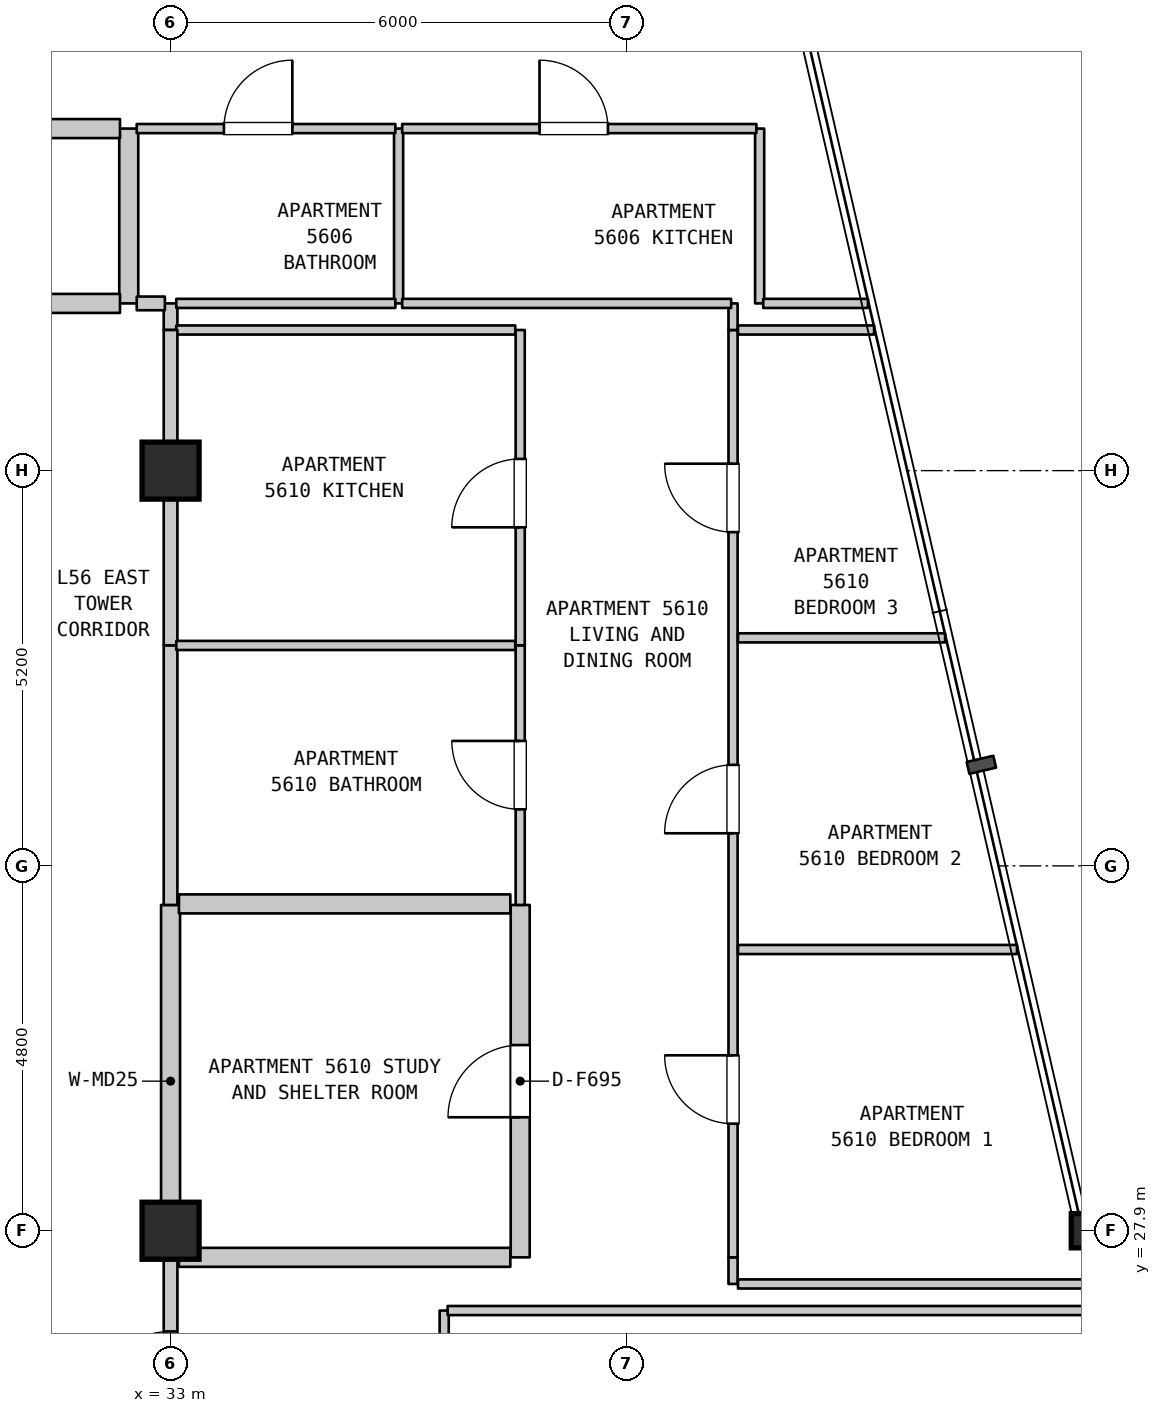
"""IFC4 building model, lengths in metres.
Left out: names, types, materials, properties, quantities, classifications, styles, units other than length and angle.
Written with IfcOpenShell. Run it as: python <this file> out.ifc"""

import sys

from ifc_helpers import new_model, si_unit, direction, frame, frame_2d, origin, origin_2d, place, context, subcontext, project, spatial, rectangle, i_section, extrude, element, fill, save


model = new_model("IFC4")
c1 = context("Model", 3, precision=1e-05, world=origin(), true_north=direction((0.0, 1.0)))
c2 = subcontext(c1, "Body", "Model", "MODEL_VIEW")
j1 = project(units=[si_unit("LENGTHUNIT", "METRE"), si_unit("PLANEANGLEUNIT", "RADIAN")], contexts=[c1])
p1 = place(None, origin())
s1 = spatial("IfcSite", under=j1, at=p1, CompositionType="ELEMENT")
p2 = place(p1, origin())
s2 = spatial("IfcBuilding", under=s1, at=p2, CompositionType="ELEMENT")
p3 = place(p2, frame((0.0, 0.0, 226.5)))
s3 = spatial("IfcBuildingStorey", under=s2, at=p3, CompositionType="ELEMENT", Elevation=226.5)
for number, where, z_axis, x_axis in (
    (1, (33.0, 27.9, 0.0), (0.0, 0.0, 1.0), (1.0, 0.0, 0.0)),
    (2, (33.0, 37.9, 0.0), (0.0, 0.0, 1.0), (1.0, 0.0, 0.0)),
):
    element("IfcColumn", number, at=place(p3, frame(where, z_axis=z_axis, x_axis=x_axis)), inside=s3, PredefinedType="COLUMN", context=c2, shape_type="SweptSolid", body=[
        extrude(rectangle(XDim=0.75, YDim=0.75, at=origin_2d()), origin(), (0.0, 0.0, 1.0), 3.7),
    ])
p4 = place(p3, frame((45.0, 27.9, 0.0), z_axis=(0.0, 0.0, 1.0), x_axis=(1.0, 0.0, 0.0)))
e3 = element("IfcColumn", 3, at=p4, inside=s3, PredefinedType="COLUMN", context=c2, shape_type="SweptSolid", body=[
    extrude(i_section(OverallWidth=0.3, OverallDepth=0.45, WebThickness=0.014, FlangeThickness=0.026, FilletRadius=0.027, at=origin_2d()), origin(), (0.0, 0.0, 1.0), 3.7),
])
p5 = place(p3, frame((32.45, 40.1, 0.0), z_axis=(0.0, 0.0, 1.0), x_axis=(0.0, 1.0, 0.0)))
e4 = element("IfcWall", 4, at=p5, inside=s3, PredefinedType="STANDARD", context=c2, shape_type="SweptSolid", body=[
    extrude(rectangle(XDim=2.3, YDim=0.25, at=frame_2d((1.15, 0.0))), origin(), (0.0, 0.0, 1.0), 3.39),
])
p6 = place(p3, frame((33.0, 24.6, 0.0), z_axis=(0.0, 0.0, 1.0), x_axis=(0.0, 1.0, 0.0)))
e5 = element("IfcWall", 5, at=p6, inside=s3, PredefinedType="STANDARD", context=c2, shape_type="SweptSolid", body=[
    extrude(rectangle(XDim=2.95, YDim=0.18, at=frame_2d((1.475, 0.0))), origin(), (0.0, 0.0, 1.0), 2.99),
])
p7 = place(p6, frame((0.975, 0.0, 0.0)))
e6 = element("IfcOpeningElement", 6, at=p7, cuts=e5, PredefinedType="OPENING", context=c2, shape_type="SweptSolid", body=[
    extrude(rectangle(XDim=1.0, YDim=2.15, at=frame_2d((0.5, 1.075))), frame((0.0, 0.1, 0.0), z_axis=(0.0, -1.0, 0.0), x_axis=(1.0, 0.0, 0.0)), (0.0, 0.0, 1.0), 0.2),
])
p8 = place(p3, frame((33.0, 27.55, 0.0), z_axis=(0.0, 0.0, 1.0), x_axis=(0.0, 1.0, 0.0)))
e7 = element("IfcWall", 7, at=p8, inside=s3, PredefinedType="STANDARD", context=c2, shape_type="SweptSolid", body=[
    extrude(rectangle(XDim=4.636, YDim=0.25, at=frame_2d((2.318, 0.0))), origin(), (0.0, 0.0, 1.0), 2.89),
])
p9 = place(p3, frame((33.0, 32.186, 0.0), z_axis=(0.0, 0.0, 1.0), x_axis=(0.0, 1.0, 0.0)))
e8 = element("IfcWall", 8, at=p9, inside=s3, PredefinedType="STANDARD", context=c2, shape_type="SweptSolid", body=[
    extrude(rectangle(XDim=3.416, YDim=0.18, at=frame_2d((1.708, 0.0))), origin(), (0.0, 0.0, 1.0), 2.89),
])
p10 = place(p3, frame((33.0, 35.602, 0.0), z_axis=(0.0, 0.0, 1.0), x_axis=(0.0, 1.0, 0.0)))
e9 = element("IfcWall", 9, at=p10, inside=s3, PredefinedType="STANDARD", context=c2, shape_type="SweptSolid", body=[
    extrude(rectangle(XDim=2.298, YDim=0.18, at=frame_2d((1.149, 0.0))), origin(), (0.0, 0.0, 1.0), 2.89),
])
p11 = place(p3, frame((33.0, 39.75, 0.0), z_axis=(0.0, 0.0, 1.0), x_axis=(0.0, 1.0, 0.0)))
e10 = element("IfcWall", 10, at=p11, inside=s3, PredefinedType="STANDARD", context=c2, shape_type="SweptSolid", body=[
    extrude(rectangle(XDim=0.35, YDim=0.18, at=frame_2d((0.175, 0.0))), origin(), (0.0, 0.0, 1.0), 3.39),
])
p12 = place(p3, frame((36.0, 40.1, 0.0), z_axis=(0.0, 0.0, 1.0), x_axis=(0.0, 1.0, 0.0)))
e11 = element("IfcWall", 11, at=p12, inside=s3, PredefinedType="PARTITIONING", context=c2, shape_type="SweptSolid", body=[
    extrude(rectangle(XDim=2.3, YDim=0.12, at=frame_2d((1.15, 0.0))), origin(), (0.0, 0.0, 1.0), 3.39),
])
p13 = place(p3, frame((36.6, 24.6, 0.0), z_axis=(0.0, 0.0, 1.0), x_axis=(0.0, 1.0, 0.0)))
e12 = element("IfcWall", 12, at=p13, inside=s3, PredefinedType="PARTITIONING", context=c2, shape_type="SweptSolid", body=[
    extrude(rectangle(XDim=2.25, YDim=0.12, at=frame_2d((1.125, 0.0))), origin(), (0.0, 0.0, 1.0), 3.39),
])
p14 = place(p13, frame((0.598, 0.0, 0.0)))
e13 = element("IfcOpeningElement", 13, at=p14, cuts=e12, PredefinedType="OPENING", context=c2, shape_type="SweptSolid", body=[
    extrude(rectangle(XDim=0.9, YDim=2.15, at=frame_2d((0.45, 1.075))), frame((0.0, 0.07, 0.0), z_axis=(0.0, -1.0, 0.0), x_axis=(1.0, 0.0, 0.0)), (0.0, 0.0, 1.0), 0.14),
])
p15 = place(p3, frame((37.6, 27.55, 0.0), z_axis=(0.0, 0.0, 1.0), x_axis=(0.0, 1.0, 0.0)))
e14 = element("IfcWall", 14, at=p15, inside=s3, PredefinedType="STANDARD", context=c2, shape_type="SweptSolid", body=[
    extrude(rectangle(XDim=4.636, YDim=0.25, at=frame_2d((2.318, 0.0))), origin(), (0.0, 0.0, 1.0), 3.39),
])
p16 = place(p15, frame((1.843, 0.0, 0.0)))
e15 = element("IfcOpeningElement", 15, at=p16, cuts=e14, PredefinedType="OPENING", context=c2, shape_type="SweptSolid", body=[
    extrude(rectangle(XDim=0.95, YDim=2.15, at=frame_2d((0.475, 1.075))), frame((0.0, 0.135, 0.0), z_axis=(0.0, -1.0, 0.0), x_axis=(1.0, 0.0, 0.0)), (0.0, 0.0, 1.0), 0.27),
])
p17 = place(p3, frame((37.6, 32.186, 0.0), z_axis=(0.0, 0.0, 1.0), x_axis=(0.0, 1.0, 0.0)))
e16 = element("IfcWall", 16, at=p17, inside=s3, PredefinedType="PARTITIONING", context=c2, shape_type="SweptSolid", body=[
    extrude(rectangle(XDim=3.416, YDim=0.12, at=frame_2d((1.708, 0.0))), origin(), (0.0, 0.0, 1.0), 3.39),
])
p18 = place(p17, frame((1.258, 0.0, 0.0)))
e17 = element("IfcOpeningElement", 17, at=p18, cuts=e16, PredefinedType="OPENING", context=c2, shape_type="SweptSolid", body=[
    extrude(rectangle(XDim=0.9, YDim=2.1, at=frame_2d((0.45, 1.05))), frame((0.0, 0.07, 0.0), z_axis=(0.0, -1.0, 0.0), x_axis=(1.0, 0.0, 0.0)), (0.0, 0.0, 1.0), 0.14),
])
p19 = place(p3, frame((37.6, 35.602, 0.0), z_axis=(0.0, 0.0, 1.0), x_axis=(0.0, 1.0, 0.0)))
e18 = element("IfcWall", 18, at=p19, inside=s3, PredefinedType="PARTITIONING", context=c2, shape_type="SweptSolid", body=[
    extrude(rectangle(XDim=4.148, YDim=0.12, at=frame_2d((2.074, 0.0))), origin(), (0.0, 0.0, 1.0), 3.39),
])
p20 = place(p19, frame((1.552, 0.0, 0.0)))
e19 = element("IfcOpeningElement", 19, at=p20, cuts=e18, PredefinedType="OPENING", context=c2, shape_type="SweptSolid", body=[
    extrude(rectangle(XDim=0.9, YDim=2.15, at=frame_2d((0.45, 1.075))), frame((0.0, 0.07, 0.0), z_axis=(0.0, -1.0, 0.0), x_axis=(1.0, 0.0, 0.0)), (0.0, 0.0, 1.0), 0.14),
])
p21 = place(p3, frame((40.4, 27.2, 0.0), z_axis=(0.0, 0.0, 1.0), x_axis=(0.0, 1.0, 0.0)))
e20 = element("IfcWall", 20, at=p21, inside=s3, PredefinedType="PARTITIONING", context=c2, shape_type="SweptSolid", body=[
    extrude(rectangle(XDim=0.35, YDim=0.12, at=frame_2d((0.175, 0.0))), origin(), (0.0, 0.0, 1.0), 3.39),
])
p22 = place(p3, frame((40.4, 27.55, 0.0), z_axis=(0.0, 0.0, 1.0), x_axis=(0.0, 1.0, 0.0)))
e21 = element("IfcWall", 21, at=p22, inside=s3, PredefinedType="PARTITIONING", context=c2, shape_type="SweptSolid", body=[
    extrude(rectangle(XDim=12.2, YDim=0.12, at=frame_2d((6.1, 0.0))), origin(), (0.0, 0.0, 1.0), 3.39),
])
p23 = place(p22, frame((1.758, 0.0, 0.0)))
e22 = element("IfcOpeningElement", 22, at=p23, cuts=e21, PredefinedType="OPENING", context=c2, shape_type="SweptSolid", body=[
    extrude(rectangle(XDim=0.9, YDim=2.15, at=frame_2d((0.45, 1.075))), frame((0.0, 0.07, 0.0), z_axis=(0.0, -1.0, 0.0), x_axis=(1.0, 0.0, 0.0)), (0.0, 0.0, 1.0), 0.14),
])
p24 = place(p22, frame((5.579, 0.0, 0.0)))
e23 = element("IfcOpeningElement", 23, at=p24, cuts=e21, PredefinedType="OPENING", context=c2, shape_type="SweptSolid", body=[
    extrude(rectangle(XDim=0.9, YDim=2.15, at=frame_2d((0.45, 1.075))), frame((0.0, 0.07, 0.0), z_axis=(0.0, -1.0, 0.0), x_axis=(1.0, 0.0, 0.0)), (0.0, 0.0, 1.0), 0.14),
])
p25 = place(p22, frame((9.541, 0.0, 0.0)))
e24 = element("IfcOpeningElement", 24, at=p25, cuts=e21, PredefinedType="OPENING", context=c2, shape_type="SweptSolid", body=[
    extrude(rectangle(XDim=0.9, YDim=2.15, at=frame_2d((0.45, 1.075))), frame((0.0, 0.07, 0.0), z_axis=(0.0, -1.0, 0.0), x_axis=(1.0, 0.0, 0.0)), (0.0, 0.0, 1.0), 0.14),
])
p26 = place(p3, frame((40.4, 39.75, 0.0), z_axis=(0.0, 0.0, 1.0), x_axis=(0.0, 1.0, 0.0)))
e25 = element("IfcWall", 25, at=p26, inside=s3, PredefinedType="PARTITIONING", context=c2, shape_type="SweptSolid", body=[
    extrude(rectangle(XDim=0.35, YDim=0.12, at=frame_2d((0.175, 0.0))), origin(), (0.0, 0.0, 1.0), 3.39),
])
p27 = place(p3, frame((40.75, 40.1, 0.0), z_axis=(0.0, 0.0, 1.0), x_axis=(0.0, 1.0, 0.0)))
e26 = element("IfcWall", 26, at=p27, inside=s3, PredefinedType="PARTITIONING", context=c2, shape_type="SweptSolid", body=[
    extrude(rectangle(XDim=2.3, YDim=0.12, at=frame_2d((1.15, 0.0))), origin(), (0.0, 0.0, 1.0), 3.39),
])
p28 = place(p3, frame((36.645, 26.85, 0.0), z_axis=(0.0, 0.0, 1.0), x_axis=(1.0, 0.0, 0.0)))
e27 = element("IfcWall", 27, at=p28, inside=s3, PredefinedType="PARTITIONING", context=c2, shape_type="SweptSolid", body=[
    extrude(rectangle(XDim=19.951, YDim=0.12, at=frame_2d((9.976, 0.0))), origin(), (0.0, 0.0, 1.0), 3.39),
])
p29 = place(p3, frame((40.465, 27.2, 0.0), z_axis=(0.0, 0.0, 1.0), x_axis=(1.0, 0.0, 0.0)))
e28 = element("IfcWall", 28, at=p29, inside=s3, PredefinedType="PARTITIONING", context=c2, shape_type="SweptSolid", body=[
    extrude(rectangle(XDim=15.986, YDim=0.12, at=frame_2d((7.993, 0.0))), origin(), (0.0, 0.0, 1.0), 3.39),
])
p30 = place(p3, frame((33.11, 27.55, 0.0), z_axis=(0.0, 0.0, 1.0), x_axis=(1.0, 0.0, 0.0)))
e29 = element("IfcWall", 29, at=p30, inside=s3, PredefinedType="STANDARD", context=c2, shape_type="SweptSolid", body=[
    extrude(rectangle(XDim=4.36, YDim=0.25, at=frame_2d((2.18, 0.0))), origin(), (0.0, 0.0, 1.0), 3.39),
])
p31 = place(p3, frame((40.465, 31.6, 0.0), z_axis=(0.0, 0.0, 1.0), x_axis=(1.0, 0.0, 0.0)))
e30 = element("IfcWall", 30, at=p31, inside=s3, PredefinedType="PARTITIONING", context=c2, shape_type="SweptSolid", body=[
    extrude(rectangle(XDim=3.671, YDim=0.12, at=frame_2d((1.835, 0.0))), origin(), (0.0, 0.0, 1.0), 3.39),
])
p32 = place(p3, frame((33.11, 32.2, 0.0), z_axis=(0.0, 0.0, 1.0), x_axis=(1.0, 0.0, 0.0)))
e31 = element("IfcWall", 31, at=p32, inside=s3, PredefinedType="STANDARD", context=c2, shape_type="SweptSolid", body=[
    extrude(rectangle(XDim=4.36, YDim=0.25, at=frame_2d((2.18, 0.0))), origin(), (0.0, 0.0, 1.0), 3.39),
])
p33 = place(p3, frame((33.075, 35.6, 0.0), z_axis=(0.0, 0.0, 1.0), x_axis=(1.0, 0.0, 0.0)))
e32 = element("IfcWall", 32, at=p33, inside=s3, PredefinedType="PARTITIONING", context=c2, shape_type="SweptSolid", body=[
    extrude(rectangle(XDim=4.46, YDim=0.12, at=frame_2d((2.23, 0.0))), origin(), (0.0, 0.0, 1.0), 3.39),
])
p34 = place(p3, frame((40.465, 35.7, 0.0), z_axis=(0.0, 0.0, 1.0), x_axis=(1.0, 0.0, 0.0)))
e33 = element("IfcWall", 33, at=p34, inside=s3, PredefinedType="PARTITIONING", context=c2, shape_type="SweptSolid", body=[
    extrude(rectangle(XDim=2.725, YDim=0.12, at=frame_2d((1.362, 0.0))), origin(), (0.0, 0.0, 1.0), 3.39),
])
p35 = place(p3, frame((33.075, 39.75, 0.0), z_axis=(0.0, 0.0, 1.0), x_axis=(1.0, 0.0, 0.0)))
e34 = element("IfcWall", 34, at=p35, inside=s3, PredefinedType="PARTITIONING", context=c2, shape_type="SweptSolid", body=[
    extrude(rectangle(XDim=4.46, YDim=0.12, at=frame_2d((2.23, 0.0))), origin(), (0.0, 0.0, 1.0), 3.39),
])
p36 = place(p3, frame((40.465, 39.75, 0.0), z_axis=(0.0, 0.0, 1.0), x_axis=(1.0, 0.0, 0.0)))
e35 = element("IfcWall", 35, at=p36, inside=s3, PredefinedType="PARTITIONING", context=c2, shape_type="SweptSolid", body=[
    extrude(rectangle(XDim=1.791, YDim=0.12, at=frame_2d((0.896, 0.0))), origin(), (0.0, 0.0, 1.0), 3.39),
])
p37 = place(p3, frame((28.16, 40.1, 0.0), z_axis=(0.0, 0.0, 1.0), x_axis=(1.0, 0.0, 0.0)))
e36 = element("IfcWall", 36, at=p37, inside=s3, PredefinedType="STANDARD", context=c2, shape_type="SweptSolid", body=[
    extrude(rectangle(XDim=4.175, YDim=0.25, at=frame_2d((2.087, 0.0))), origin(), (0.0, 0.0, 1.0), 3.39),
])
p38 = place(p3, frame((32.555, 40.1, 0.0), z_axis=(0.0, 0.0, 1.0), x_axis=(1.0, 0.0, 0.0)))
e37 = element("IfcWall", 37, at=p38, inside=s3, PredefinedType="STANDARD", context=c2, shape_type="SweptSolid", body=[
    extrude(rectangle(XDim=0.37, YDim=0.18, at=frame_2d((0.185, 0.0))), origin(), (0.0, 0.0, 1.0), 3.39),
])
p39 = place(p3, frame((33.075, 40.1, 0.0), z_axis=(0.0, 0.0, 1.0), x_axis=(1.0, 0.0, 0.0)))
e38 = element("IfcWall", 38, at=p39, inside=s3, PredefinedType="PARTITIONING", context=c2, shape_type="SweptSolid", body=[
    extrude(rectangle(XDim=2.882, YDim=0.12, at=frame_2d((1.441, 0.0))), origin(), (0.0, 0.0, 1.0), 3.39),
])
p40 = place(p3, frame((36.047, 40.1, 0.0), z_axis=(0.0, 0.0, 1.0), x_axis=(1.0, 0.0, 0.0)))
e39 = element("IfcWall", 39, at=p40, inside=s3, PredefinedType="PARTITIONING", context=c2, shape_type="SweptSolid", body=[
    extrude(rectangle(XDim=4.328, YDim=0.12, at=frame_2d((2.164, 0.0))), origin(), (0.0, 0.0, 1.0), 3.39),
])
p41 = place(p3, frame((40.797, 40.1, 0.0), z_axis=(0.0, 0.0, 1.0), x_axis=(1.0, 0.0, 0.0)))
e40 = element("IfcWall", 40, at=p41, inside=s3, PredefinedType="PARTITIONING", context=c2, shape_type="SweptSolid", body=[
    extrude(rectangle(XDim=1.378, YDim=0.12, at=frame_2d((0.689, 0.0))), origin(), (0.0, 0.0, 1.0), 3.39),
])
p42 = place(p3, frame((28.16, 42.4, 0.0), z_axis=(0.0, 0.0, 1.0), x_axis=(1.0, 0.0, 0.0)))
e41 = element("IfcWall", 41, at=p42, inside=s3, PredefinedType="STANDARD", context=c2, shape_type="SweptSolid", body=[
    extrude(rectangle(XDim=4.175, YDim=0.25, at=frame_2d((2.087, 0.0))), origin(), (0.0, 0.0, 1.0), 3.39),
])
p43 = place(p42, frame((1.542, 0.0, 0.0)))
e42 = element("IfcOpeningElement", 42, at=p43, cuts=e41, PredefinedType="OPENING", context=c2, shape_type="SweptSolid", body=[
    extrude(rectangle(XDim=0.95, YDim=2.15, at=frame_2d((0.475, 1.075))), frame((0.0, 0.135, 0.0), z_axis=(0.0, -1.0, 0.0), x_axis=(1.0, 0.0, 0.0)), (0.0, 0.0, 1.0), 0.27),
])
p44 = place(p3, frame((32.555, 42.4, 0.0), z_axis=(0.0, 0.0, 1.0), x_axis=(1.0, 0.0, 0.0)))
e43 = element("IfcWall", 43, at=p44, inside=s3, PredefinedType="PARTITIONING", context=c2, shape_type="SweptSolid", body=[
    extrude(rectangle(XDim=3.402, YDim=0.12, at=frame_2d((1.701, 0.0))), origin(), (0.0, 0.0, 1.0), 3.39),
])
p45 = place(p44, frame((1.147, 0.0, 0.0)))
e44 = element("IfcOpeningElement", 44, at=p45, cuts=e43, PredefinedType="OPENING", context=c2, shape_type="SweptSolid", body=[
    extrude(rectangle(XDim=0.9, YDim=2.1, at=frame_2d((0.45, 1.05))), frame((0.0, 0.07, 0.0), z_axis=(0.0, -1.0, 0.0), x_axis=(1.0, 0.0, 0.0)), (0.0, 0.0, 1.0), 0.14),
])
p46 = place(p3, frame((36.047, 42.4, 0.0), z_axis=(0.0, 0.0, 1.0), x_axis=(1.0, 0.0, 0.0)))
e45 = element("IfcWall", 45, at=p46, inside=s3, PredefinedType="PARTITIONING", context=c2, shape_type="SweptSolid", body=[
    extrude(rectangle(XDim=4.66, YDim=0.12, at=frame_2d((2.33, 0.0))), origin(), (0.0, 0.0, 1.0), 3.39),
])
p47 = place(p46, frame((1.807, 0.0, 0.0)))
e46 = element("IfcOpeningElement", 46, at=p47, cuts=e45, PredefinedType="OPENING", context=c2, shape_type="SweptSolid", body=[
    extrude(rectangle(XDim=0.9, YDim=2.15, at=frame_2d((0.45, 1.075))), frame((0.0, 0.07, 0.0), z_axis=(0.0, -1.0, 0.0), x_axis=(1.0, 0.0, 0.0)), (0.0, 0.0, 1.0), 0.14),
])
p48 = place(p3, frame((33.0, 37.9, 0.0), z_axis=(0.0, 0.0, 1.0), x_axis=(0.0, 1.0, 0.0)))
e47 = element("IfcWall", 47, at=p48, inside=s3, PredefinedType="STANDARD", context=c2, shape_type="SweptSolid", body=[
    extrude(rectangle(XDim=1.85, YDim=0.18, at=frame_2d((0.925, 0.0))), origin(), (0.0, 0.0, 1.0), 2.79),
])
p49 = place(p7, origin())
e48 = element("IfcDoor", 48, at=p49, inside=s3, OperationType="SINGLE_SWING_LEFT", PredefinedType="DOOR", context=c2, shape_type="SweptSolid", body=[
    extrude(rectangle(XDim=1.0, YDim=2.15, at=frame_2d((0.5, 1.075))), frame((0.0, 0.025, 0.0), z_axis=(0.0, -1.0, 0.0), x_axis=(1.0, 0.0, 0.0)), (0.0, 0.0, 1.0), 0.05),
])
fill(e6, e48)
p50 = place(p16, origin())
e49 = element("IfcDoor", 49, at=p50, inside=s3, OperationType="SINGLE_SWING_LEFT", PredefinedType="DOOR", context=c2, shape_type="SweptSolid", body=[
    extrude(rectangle(XDim=0.95, YDim=2.15, at=frame_2d((0.475, 1.075))), frame((0.0, 0.025, 0.0), z_axis=(0.0, -1.0, 0.0), x_axis=(1.0, 0.0, 0.0)), (0.0, 0.0, 1.0), 0.05),
])
fill(e15, e49)
p51 = place(p18, origin())
e50 = element("IfcDoor", 50, at=p51, inside=s3, OperationType="SINGLE_SWING_RIGHT", PredefinedType="DOOR", context=c2, shape_type="SweptSolid", body=[
    extrude(rectangle(XDim=0.9, YDim=2.1, at=frame_2d((0.45, 1.05))), frame((0.0, 0.025, 0.0), z_axis=(0.0, -1.0, 0.0), x_axis=(1.0, 0.0, 0.0)), (0.0, 0.0, 1.0), 0.05),
])
fill(e17, e50)
p52 = place(p20, origin())
e51 = element("IfcDoor", 51, at=p52, inside=s3, OperationType="SINGLE_SWING_LEFT", PredefinedType="DOOR", context=c2, shape_type="SweptSolid", body=[
    extrude(rectangle(XDim=0.9, YDim=2.15, at=frame_2d((0.45, 1.075))), frame((0.0, 0.025, 0.0), z_axis=(0.0, -1.0, 0.0), x_axis=(1.0, 0.0, 0.0)), (0.0, 0.0, 1.0), 0.05),
])
fill(e19, e51)
p53 = place(p23, origin())
e52 = element("IfcDoor", 52, at=p53, inside=s3, OperationType="SINGLE_SWING_RIGHT", PredefinedType="DOOR", context=c2, shape_type="SweptSolid", body=[
    extrude(rectangle(XDim=0.9, YDim=2.15, at=frame_2d((0.45, 1.075))), frame((0.0, 0.025, 0.0), z_axis=(0.0, -1.0, 0.0), x_axis=(1.0, 0.0, 0.0)), (0.0, 0.0, 1.0), 0.05),
])
fill(e22, e52)
p54 = place(p24, origin())
e53 = element("IfcDoor", 53, at=p54, inside=s3, OperationType="SINGLE_SWING_LEFT", PredefinedType="DOOR", context=c2, shape_type="SweptSolid", body=[
    extrude(rectangle(XDim=0.9, YDim=2.15, at=frame_2d((0.45, 1.075))), frame((0.0, 0.025, 0.0), z_axis=(0.0, -1.0, 0.0), x_axis=(1.0, 0.0, 0.0)), (0.0, 0.0, 1.0), 0.05),
])
fill(e23, e53)
p55 = place(p25, origin())
e54 = element("IfcDoor", 54, at=p55, inside=s3, OperationType="SINGLE_SWING_RIGHT", PredefinedType="DOOR", context=c2, shape_type="SweptSolid", body=[
    extrude(rectangle(XDim=0.9, YDim=2.15, at=frame_2d((0.45, 1.075))), frame((0.0, 0.025, 0.0), z_axis=(0.0, -1.0, 0.0), x_axis=(1.0, 0.0, 0.0)), (0.0, 0.0, 1.0), 0.05),
])
fill(e24, e54)
p56 = place(p45, origin())
e55 = element("IfcDoor", 55, at=p56, inside=s3, OperationType="SINGLE_SWING_RIGHT", PredefinedType="DOOR", context=c2, shape_type="SweptSolid", body=[
    extrude(rectangle(XDim=0.9, YDim=2.1, at=frame_2d((0.45, 1.05))), frame((0.0, 0.025, 0.0), z_axis=(0.0, -1.0, 0.0), x_axis=(1.0, 0.0, 0.0)), (0.0, 0.0, 1.0), 0.05),
])
fill(e44, e55)
p57 = place(p47, origin())
e56 = element("IfcDoor", 56, at=p57, inside=s3, OperationType="SINGLE_SWING_LEFT", PredefinedType="DOOR", context=c2, shape_type="SweptSolid", body=[
    extrude(rectangle(XDim=0.9, YDim=2.15, at=frame_2d((0.45, 1.075))), frame((0.0, 0.025, 0.0), z_axis=(0.0, -1.0, 0.0), x_axis=(1.0, 0.0, 0.0)), (0.0, 0.0, 1.0), 0.05),
])
fill(e46, e56)
save(model, sys.argv[1])
